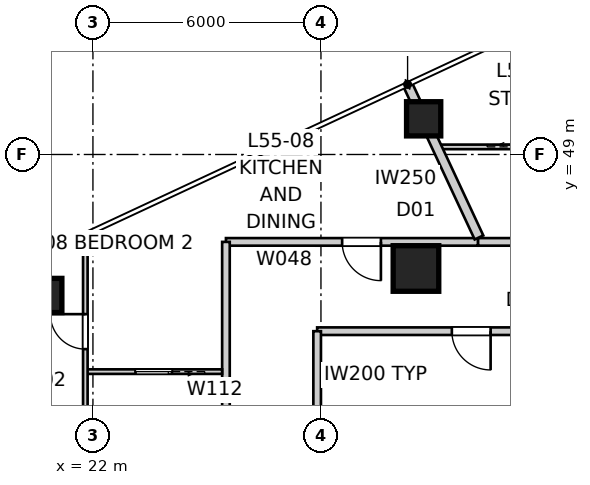
"""IFC4 building model, lengths in metres.
Left out: names, types, materials, properties, quantities, classifications, styles, units other than length and angle.
Written with IfcOpenShell. Run it as: python <this file> out.ifc"""

import sys

from ifc_helpers import new_model, si_unit, direction, frame, frame_2d, origin, origin_2d, place, context, subcontext, project, spatial, rectangle, extrude, element, fill, save


model = new_model("IFC4")
c1 = context("Model", 3, precision=1e-05, world=origin(), true_north=direction((0.0, 1.0)))
c2 = subcontext(c1, "Body", "Model", "MODEL_VIEW")
j1 = project(units=[si_unit("LENGTHUNIT", "METRE"), si_unit("PLANEANGLEUNIT", "RADIAN")], contexts=[c1])
p1 = place(None, origin())
s1 = spatial("IfcSite", under=j1, at=p1, CompositionType="ELEMENT")
p2 = place(p1, origin())
s2 = spatial("IfcBuilding", under=s1, at=p2, CompositionType="ELEMENT")
p3 = place(p2, frame((0.0, 0.0, 199.8)))
s3 = spatial("IfcBuildingStorey", under=s2, at=p3, CompositionType="ELEMENT", Elevation=199.8)
for number, where, z_axis, x_axis in (
    (1, (30.702, 49.939, 0.0), (0.0, 0.0, 1.0), (1.0, 0.0, 0.0)),
    (2, (20.733, 45.29, 0.0), (0.0, 0.0, 1.0), (1.0, 0.0, 0.0)),
):
    element("IfcColumn", number, at=place(p3, frame(where, z_axis=z_axis, x_axis=x_axis)), inside=s3, PredefinedType="COLUMN", context=c2, shape_type="SweptSolid", body=[
        extrude(rectangle(XDim=0.9, YDim=0.9, at=origin_2d()), origin(), (0.0, 0.0, 1.0), 3.2),
    ])
p4 = place(p3, frame((30.5, 46.0, 0.0), z_axis=(0.0, 0.0, 1.0), x_axis=(1.0, 0.0, 0.0)))
e3 = element("IfcColumn", 3, at=p4, inside=s3, PredefinedType="COLUMN", context=c2, shape_type="SweptSolid", body=[
    extrude(rectangle(XDim=1.2, YDim=1.2, at=origin_2d()), origin(), (0.0, 0.0, 1.0), 3.4),
])
p5 = place(p3, frame((34.003, 46.7, 0.0), z_axis=(0.0, 0.0, 1.0), x_axis=(-1.0, 0.0, 0.0)))
e4 = element("IfcWall", 4, at=p5, inside=s3, PredefinedType="PARTITIONING", context=c2, shape_type="SweptSolid", body=[
    extrude(rectangle(XDim=1.874, YDim=0.2, at=frame_2d((0.937, 0.0))), origin(), (0.0, 0.0, 1.0), 2.2),
])
p6 = place(p3, frame((32.13, 46.7, 0.0), z_axis=(0.0, 0.0, 1.0), x_axis=(-1.0, 0.0, 0.0)))
e5 = element("IfcWall", 5, at=p6, inside=s3, PredefinedType="PARTITIONING", context=c2, shape_type="SweptSolid", body=[
    extrude(rectangle(XDim=6.63, YDim=0.2, at=frame_2d((3.315, 0.0))), origin(), (0.0, 0.0, 1.0), 3.2),
])
p7 = place(p6, frame((2.552, 0.0, 0.0)))
e6 = element("IfcOpeningElement", 6, at=p7, cuts=e5, PredefinedType="OPENING", context=c2, shape_type="SweptSolid", body=[
    extrude(rectangle(XDim=1.02, YDim=2.34, at=frame_2d((0.51, 1.17))), frame((0.0, 0.11, 0.0), z_axis=(0.0, -1.0, 0.0), x_axis=(1.0, 0.0, 0.0)), (0.0, 0.0, 1.0), 0.22),
])
p8 = place(p3, frame((25.5, 46.7, 0.0), z_axis=(0.0, 0.0, 1.0), x_axis=(0.0, -1.0, 0.0)))
e7 = element("IfcWall", 7, at=p8, inside=s3, PredefinedType="PARTITIONING", context=c2, shape_type="SweptSolid", body=[
    extrude(rectangle(XDim=33.8, YDim=0.2, at=frame_2d((16.9, 0.0))), origin(), (0.0, 0.0, 1.0), 3.2),
])
p9 = place(p8, frame((15.349, 0.0, 0.0)))
e8 = element("IfcOpeningElement", 8, at=p9, cuts=e7, PredefinedType="OPENING", context=c2, shape_type="SweptSolid", body=[
    extrude(rectangle(XDim=1.02, YDim=2.34, at=frame_2d((0.51, 1.17))), frame((0.0, 0.11, 0.0), z_axis=(0.0, -1.0, 0.0), x_axis=(1.0, 0.0, 0.0)), (0.0, 0.0, 1.0), 0.22),
])
p10 = place(p3, frame((30.28, 50.845, 0.0), z_axis=(0.0, 0.0, 1.0), x_axis=(0.422614816594, -0.906309393527, 0.0)))
e9 = element("IfcWall", 9, at=p10, inside=s3, PredefinedType="PARTITIONING", context=c2, shape_type="SweptSolid", body=[
    extrude(rectangle(XDim=4.445, YDim=0.25, at=frame_2d((2.222, 0.0))), origin(), (0.0, 0.0, 1.0), 3.2),
])
p11 = place(p3, frame((52.1, 44.35, 0.0), z_axis=(0.0, 0.0, 1.0), x_axis=(-1.0, 0.0, 0.0)))
e10 = element("IfcWall", 10, at=p11, inside=s3, PredefinedType="PARTITIONING", context=c2, shape_type="SweptSolid", body=[
    extrude(rectangle(XDim=24.2, YDim=0.2, at=frame_2d((12.1, 0.0))), origin(), (0.0, 0.0, 1.0), 3.2),
])
p12 = place(p11, frame((10.743, 0.0, 0.0)))
e11 = element("IfcOpeningElement", 11, at=p12, cuts=e10, PredefinedType="OPENING", context=c2, shape_type="SweptSolid", body=[
    extrude(rectangle(XDim=1.02, YDim=2.1, at=frame_2d((0.51, 1.05))), frame((0.0, 0.11, 0.0), z_axis=(0.0, -1.0, 0.0), x_axis=(1.0, 0.0, 0.0)), (0.0, 0.0, 1.0), 0.22),
])
p13 = place(p11, frame((19.636, 0.0, 0.0)))
e12 = element("IfcOpeningElement", 12, at=p13, cuts=e10, PredefinedType="OPENING", context=c2, shape_type="SweptSolid", body=[
    extrude(rectangle(XDim=1.02, YDim=2.1, at=frame_2d((0.51, 1.05))), frame((0.0, 0.11, 0.0), z_axis=(0.0, -1.0, 0.0), x_axis=(1.0, 0.0, 0.0)), (0.0, 0.0, 1.0), 0.22),
])
p14 = place(p11, frame((3.297, 0.0, 0.0)))
e13 = element("IfcOpeningElement", 13, at=p14, cuts=e10, PredefinedType="OPENING", context=c2, shape_type="SweptSolid", body=[
    extrude(rectangle(XDim=1.02, YDim=2.1, at=frame_2d((0.51, 1.05))), frame((0.0, 0.11, 0.0), z_axis=(0.0, -1.0, 0.0), x_axis=(1.0, 0.0, 0.0)), (0.0, 0.0, 1.0), 0.22),
])
p15 = place(p3, frame((27.9, 44.35, 0.0), z_axis=(0.0, 0.0, 1.0), x_axis=(0.0, -1.0, 0.0)))
e14 = element("IfcWall", 14, at=p15, inside=s3, PredefinedType="PARTITIONING", context=c2, shape_type="SweptSolid", body=[
    extrude(rectangle(XDim=2.3, YDim=0.2, at=frame_2d((1.15, 0.0))), origin(), (0.0, 0.0, 1.0), 3.2),
])
p16 = place(p3, frame((31.047, 49.2, 0.0), z_axis=(0.0, 0.0, 1.0), x_axis=(1.0, 0.0, 0.0)))
e15 = element("IfcWall", 15, at=p16, inside=s3, PredefinedType="PARTITIONING", context=c2, shape_type="SweptSolid", body=[
    extrude(rectangle(XDim=25.333, YDim=0.12, at=frame_2d((12.667, 0.0))), origin(), (0.0, 0.0, 1.0), 3.2),
])
p17 = place(p16, frame((14.154, 0.0, 0.0)))
e16 = element("IfcOpeningElement", 16, at=p17, cuts=e15, PredefinedType="OPENING", context=c2, shape_type="SweptSolid", body=[
    extrude(rectangle(XDim=0.92, YDim=2.34, at=frame_2d((0.46, 1.17))), frame((0.0, 0.07, 0.0), z_axis=(0.0, -1.0, 0.0), x_axis=(1.0, 0.0, 0.0)), (0.0, 0.0, 1.0), 0.14),
])
p18 = place(p16, frame((18.62, 0.0, 0.0)))
e17 = element("IfcOpeningElement", 17, at=p18, cuts=e15, PredefinedType="OPENING", context=c2, shape_type="SweptSolid", body=[
    extrude(rectangle(XDim=0.92, YDim=2.34, at=frame_2d((0.46, 1.17))), frame((0.0, 0.07, 0.0), z_axis=(0.0, -1.0, 0.0), x_axis=(1.0, 0.0, 0.0)), (0.0, 0.0, 1.0), 0.14),
])
p19 = place(p16, frame((8.576, 0.0, 0.0)))
e18 = element("IfcOpeningElement", 18, at=p19, cuts=e15, PredefinedType="OPENING", context=c2, shape_type="SweptSolid", body=[
    extrude(rectangle(XDim=0.92, YDim=2.34, at=frame_2d((0.46, 1.17))), frame((0.0, 0.07, 0.0), z_axis=(0.0, -1.0, 0.0), x_axis=(1.0, 0.0, 0.0)), (0.0, 0.0, 1.0), 0.14),
])
p20 = place(p16, frame((2.19, 0.0, 0.0)))
e19 = element("IfcOpeningElement", 19, at=p20, cuts=e15, PredefinedType="OPENING", context=c2, shape_type="SweptSolid", body=[
    extrude(rectangle(XDim=0.96, YDim=2.1, at=frame_2d((0.48, 1.05))), frame((0.0, 0.07, 0.0), z_axis=(0.0, -1.0, 0.0), x_axis=(1.0, 0.0, 0.0)), (0.0, 0.0, 1.0), 0.14),
])
p21 = place(p3, frame((25.4, 43.286, 0.0), z_axis=(0.0, 0.0, 1.0), x_axis=(-1.0, 0.0, 0.0)))
e20 = element("IfcWall", 20, at=p21, inside=s3, PredefinedType="PARTITIONING", context=c2, shape_type="SweptSolid", body=[
    extrude(rectangle(XDim=3.6, YDim=0.12, at=frame_2d((1.8, 0.0))), origin(), (0.0, 0.0, 1.0), 3.2),
])
p22 = place(p21, frame((1.32, 0.0, 0.0)))
e21 = element("IfcOpeningElement", 21, at=p22, cuts=e20, PredefinedType="OPENING", context=c2, shape_type="SweptSolid", body=[
    extrude(rectangle(XDim=0.96, YDim=2.1, at=frame_2d((0.48, 1.05))), frame((0.0, 0.07, 0.0), z_axis=(0.0, -1.0, 0.0), x_axis=(1.0, 0.0, 0.0)), (0.0, 0.0, 1.0), 0.14),
])
p23 = place(p3, frame((21.8, 31.995, 0.0), z_axis=(0.0, 0.0, 1.0), x_axis=(0.0, 1.0, 0.0)))
e22 = element("IfcWall", 22, at=p23, inside=s3, PredefinedType="PARTITIONING", context=c2, shape_type="SweptSolid", body=[
    extrude(rectangle(XDim=14.851, YDim=0.12, at=frame_2d((7.426, 0.0))), origin(), (0.0, 0.0, 1.0), 3.2),
])
p24 = place(p23, frame((11.883, 0.0, 0.0)))
e23 = element("IfcOpeningElement", 23, at=p24, cuts=e22, PredefinedType="OPENING", context=c2, shape_type="SweptSolid", body=[
    extrude(rectangle(XDim=0.92, YDim=2.34, at=frame_2d((0.46, 1.17))), frame((0.0, 0.07, 0.0), z_axis=(0.0, -1.0, 0.0), x_axis=(1.0, 0.0, 0.0)), (0.0, 0.0, 1.0), 0.14),
])
p25 = place(p23, frame((2.698, 0.0, 0.0)))
e24 = element("IfcOpeningElement", 24, at=p25, cuts=e22, PredefinedType="OPENING", context=c2, shape_type="SweptSolid", body=[
    extrude(rectangle(XDim=0.96, YDim=2.1, at=frame_2d((0.48, 1.05))), frame((0.0, 0.07, 0.0), z_axis=(0.0, -1.0, 0.0), x_axis=(1.0, 0.0, 0.0)), (0.0, 0.0, 1.0), 0.14),
])
p26 = place(p3, frame((17.382, 44.787, 0.0), z_axis=(0.0, 0.0, 1.0), x_axis=(0.422604635972, -0.906314140712, 0.0)))
e25 = element("IfcWall", 25, at=p26, inside=s3, PredefinedType="PARTITIONING", context=c2, shape_type="SweptSolid", body=[
    extrude(rectangle(XDim=8.71, YDim=0.12, at=frame_2d((4.355, 0.0))), origin(), (0.0, 0.0, 1.0), 3.2),
])
p27 = place(p26, frame((3.875, 0.0, 0.0)))
e26 = element("IfcOpeningElement", 26, at=p27, cuts=e25, PredefinedType="OPENING", context=c2, shape_type="SweptSolid", body=[
    extrude(rectangle(XDim=0.92, YDim=2.34, at=frame_2d((0.46, 1.17))), frame((0.0, 0.07, 0.0), z_axis=(0.0, -1.0, 0.0), x_axis=(1.0, 0.0, 0.0)), (0.0, 0.0, 1.0), 0.14),
])
p28 = place(p13, origin())
e27 = element("IfcDoor", 27, at=p28, inside=s3, OperationType="SINGLE_SWING_LEFT", PredefinedType="DOOR", context=c2, shape_type="SweptSolid", body=[
    extrude(rectangle(XDim=1.02, YDim=2.1, at=frame_2d((0.51, 1.05))), frame((0.0, 0.025, 0.0), z_axis=(0.0, -1.0, 0.0), x_axis=(1.0, 0.0, 0.0)), (0.0, 0.0, 1.0), 0.05),
])
fill(e12, e27)
p29 = place(p7, origin())
e28 = element("IfcDoor", 28, at=p29, inside=s3, OperationType="SINGLE_SWING_LEFT", PredefinedType="DOOR", context=c2, shape_type="SweptSolid", body=[
    extrude(rectangle(XDim=1.02, YDim=2.34, at=frame_2d((0.51, 1.17))), frame((0.0, 0.025, 0.0), z_axis=(0.0, -1.0, 0.0), x_axis=(1.0, 0.0, 0.0)), (0.0, 0.0, 1.0), 0.05),
])
fill(e6, e28)
p30 = place(p24, origin())
e29 = element("IfcDoor", 29, at=p30, inside=s3, OperationType="SINGLE_SWING_RIGHT", PredefinedType="DOOR", context=c2, shape_type="SweptSolid", body=[
    extrude(rectangle(XDim=0.92, YDim=2.34, at=frame_2d((0.46, 1.17))), frame((0.0, 0.025, 0.0), z_axis=(0.0, -1.0, 0.0), x_axis=(1.0, 0.0, 0.0)), (0.0, 0.0, 1.0), 0.05),
])
fill(e23, e29)
p31 = place(p22, origin())
e30 = element("IfcDoor", 30, at=p31, inside=s3, OperationType="SLIDING_TO_LEFT", PredefinedType="DOOR", context=c2, shape_type="SweptSolid", body=[
    extrude(rectangle(XDim=0.96, YDim=2.1, at=frame_2d((0.48, 1.05))), frame((0.0, 0.025, 0.0), z_axis=(0.0, -1.0, 0.0), x_axis=(1.0, 0.0, 0.0)), (0.0, 0.0, 1.0), 0.05),
])
fill(e21, e30)
save(model, sys.argv[1])
